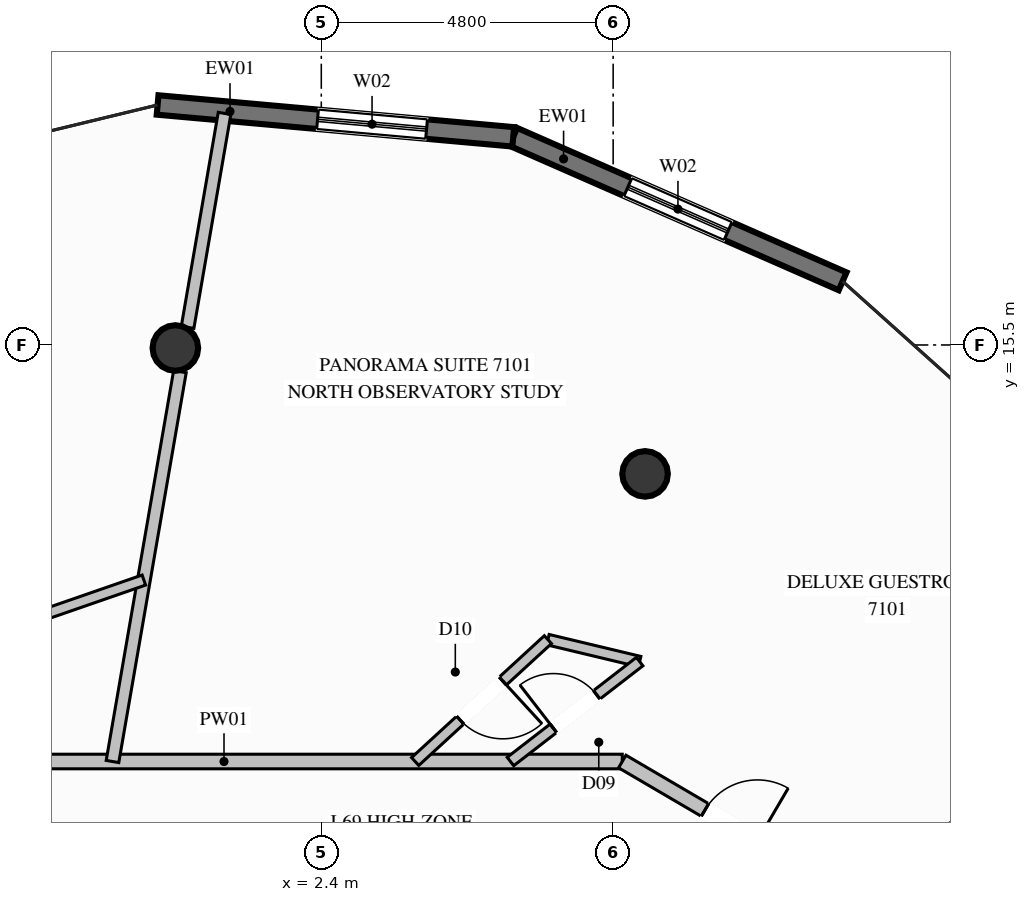
"""IFC4 building model, lengths in metres.
Left out: names, types, materials, properties, quantities, classifications, styles, units other than length and angle.
Written with IfcOpenShell. Run it as: python <this file> out.ifc"""

import sys

from ifc_helpers import new_model, si_unit, direction, frame, frame_2d, origin, origin_2d, place, context, subcontext, project, spatial, rectangle, circle, extrude, element, fill, save


model = new_model("IFC4")
c1 = context("Model", 3, precision=1e-05, world=origin(), true_north=direction((0.0, 1.0)))
c2 = subcontext(c1, "Body", "Model", "MODEL_VIEW")
j1 = project(units=[si_unit("LENGTHUNIT", "METRE"), si_unit("PLANEANGLEUNIT", "RADIAN")], contexts=[c1])
p1 = place(None, origin())
s1 = spatial("IfcSite", under=j1, at=p1, CompositionType="ELEMENT")
p2 = place(p1, origin())
s2 = spatial("IfcBuilding", under=s1, at=p2, CompositionType="ELEMENT")
p3 = place(p2, frame((0.0, 0.0, 266.8)))
s3 = spatial("IfcBuildingStorey", under=s2, at=p3, CompositionType="ELEMENT", Elevation=266.8)
for number, where, z_axis, x_axis in (
    (1, (7.725, 13.38, 0.0), (0.0, 0.0, 1.0), (1.0, 0.0, 0.0)),
    (2, (0.0, 15.45, 0.0), (0.0, 0.0, 1.0), (1.0, 0.0, 0.0)),
):
    element("IfcColumn", number, at=place(p3, frame(where, z_axis=z_axis, x_axis=x_axis)), inside=s3, PredefinedType="COLUMN", context=c2, shape_type="SweptSolid", body=[
        extrude(circle(Radius=0.375, at=origin_2d()), origin(), (0.0, 0.0, 1.0), 3.8),
    ])
p4 = place(p3, frame((5.557, 18.923, 0.0), z_axis=(0.0, 0.0, 1.0), x_axis=(0.915788475135, -0.401660887828, 0.0)))
e3 = element("IfcWall", 3, at=p4, inside=s3, PredefinedType="SOLIDWALL", context=c2, shape_type="SweptSolid", body=[
    extrude(rectangle(XDim=5.915, YDim=0.32, at=frame_2d((2.958, 0.0))), origin(), (0.0, 0.0, 1.0), 3.57),
])
p5 = place(p4, frame((2.058, 0.0, 0.35)))
e4 = element("IfcOpeningElement", 4, at=p5, cuts=e3, PredefinedType="OPENING", context=c2, shape_type="SweptSolid", body=[
    extrude(rectangle(XDim=1.8, YDim=2.6, at=frame_2d((0.9, 1.3))), frame((0.0, 0.17, 0.0), z_axis=(0.0, -1.0, 0.0), x_axis=(1.0, 0.0, 0.0)), (0.0, 0.0, 1.0), 0.34),
])
p6 = place(p3, frame((-0.292, 19.447, 0.0), z_axis=(0.0, 0.0, 1.0), x_axis=(0.996011950585, -0.08921992094, 0.0)))
e5 = element("IfcWall", 5, at=p6, inside=s3, PredefinedType="SOLIDWALL", context=c2, shape_type="SweptSolid", body=[
    extrude(rectangle(XDim=5.872, YDim=0.32, at=frame_2d((2.936, 0.0))), origin(), (0.0, 0.0, 1.0), 3.57),
])
p7 = place(p6, frame((2.641, 0.0, 0.35)))
e6 = element("IfcOpeningElement", 6, at=p7, cuts=e5, PredefinedType="OPENING", context=c2, shape_type="SweptSolid", body=[
    extrude(rectangle(XDim=1.8, YDim=2.6, at=frame_2d((0.9, 1.3))), frame((0.0, 0.17, 0.0), z_axis=(0.0, -1.0, 0.0), x_axis=(1.0, 0.0, 0.0)), (0.0, 0.0, 1.0), 0.34),
])
p8 = place(p3, frame((-5.75, 8.65, 0.0), z_axis=(0.0, 0.0, 1.0), x_axis=(1.0, 0.0, 0.0)))
e7 = element("IfcWall", 7, at=p8, inside=s3, PredefinedType="PARTITIONING", context=c2, shape_type="SweptSolid", body=[
    extrude(rectangle(XDim=13.1, YDim=0.24, at=frame_2d((6.55, 0.0))), origin(), (0.0, 0.0, 1.0), 3.57),
])
p9 = place(p3, frame((10.935, 6.55, 0.0), z_axis=(0.0, 0.0, 1.0), x_axis=(0.8804878863, 0.474068647011, 0.0)))
e8 = element("IfcWall", 8, at=p9, inside=s3, PredefinedType="PARTITIONING", context=c2, shape_type="SweptSolid", body=[
    extrude(rectangle(XDim=2.335, YDim=0.21, at=frame_2d((1.167, 0.0))), origin(), (0.0, 0.0, 1.0), 3.085),
])
p10 = place(p3, frame((6.127, 10.654, 0.0), z_axis=(0.0, 0.0, 1.0), x_axis=(0.972545612194, -0.23271233788, 0.0)))
e9 = element("IfcWall", 9, at=p10, inside=s3, PredefinedType="PLUMBINGWALL", context=c2, shape_type="SweptSolid", body=[
    extrude(rectangle(XDim=1.552, YDim=0.175, at=frame_2d((0.776, 0.0))), origin(), (0.0, 0.0, 1.0), 3.57),
])
p11 = place(p3, frame((6.127, 10.654, 0.0), z_axis=(0.0, 0.0, 1.0), x_axis=(-0.736616996747, -0.676310136035, 0.0)))
e10 = element("IfcWall", 10, at=p11, inside=s3, PredefinedType="PLUMBINGWALL", context=c2, shape_type="SweptSolid", body=[
    extrude(rectangle(XDim=2.963, YDim=0.175, at=frame_2d((1.482, 0.0))), origin(), (0.0, 0.0, 1.0), 3.57),
])
p12 = place(p11, frame((1.007, 0.0, 0.0)))
e11 = element("IfcOpeningElement", 11, at=p12, cuts=e10, PredefinedType="OPENING", context=c2, shape_type="SweptSolid", body=[
    extrude(rectangle(XDim=0.95, YDim=2.1, at=frame_2d((0.475, 1.05))), frame((0.0, 0.098, 0.0), z_axis=(0.0, -1.0, 0.0), x_axis=(1.0, 0.0, 0.0)), (0.0, 0.0, 1.0), 0.195),
])
p13 = place(p3, frame((5.511, 8.65, 0.0), z_axis=(0.0, 0.0, 1.0), x_axis=(0.791101070426, 0.611685455419, 0.0)))
e12 = element("IfcWall", 12, at=p13, inside=s3, PredefinedType="PLUMBINGWALL", context=c2, shape_type="SweptSolid", body=[
    extrude(rectangle(XDim=2.686, YDim=0.175, at=frame_2d((1.343, 0.0))), origin(), (0.0, 0.0, 1.0), 3.57),
])
p14 = place(p13, frame((0.893, 0.0, 0.0)))
e13 = element("IfcOpeningElement", 13, at=p14, cuts=e12, PredefinedType="OPENING", context=c2, shape_type="SweptSolid", body=[
    extrude(rectangle(XDim=0.9, YDim=2.1, at=frame_2d((0.45, 1.05))), frame((0.0, 0.098, 0.0), z_axis=(0.0, -1.0, 0.0), x_axis=(1.0, 0.0, 0.0)), (0.0, 0.0, 1.0), 0.195),
])
p15 = place(p3, frame((7.35, 8.65, 0.0), z_axis=(0.0, 0.0, 1.0), x_axis=(0.862873842462, -0.505419362505, 0.0)))
e14 = element("IfcWall", 14, at=p15, inside=s3, PredefinedType="PARTITIONING", context=c2, shape_type="SweptSolid", body=[
    extrude(rectangle(XDim=4.155, YDim=0.24, at=frame_2d((2.077, 0.0))), origin(), (0.0, 0.0, 1.0), 3.57),
])
p16 = place(p15, frame((1.577, 0.0, 0.0)))
e15 = element("IfcOpeningElement", 15, at=p16, cuts=e14, PredefinedType="OPENING", context=c2, shape_type="SweptSolid", body=[
    extrude(rectangle(XDim=1.0, YDim=2.2, at=frame_2d((0.5, 1.1))), frame((0.0, 0.13, 0.0), z_axis=(0.0, -1.0, 0.0), x_axis=(1.0, 0.0, 0.0)), (0.0, 0.0, 1.0), 0.26),
])
p17 = place(p3, frame((-1.034, 8.65, 0.0), z_axis=(0.0, 0.0, 1.0), x_axis=(0.170406932978, 0.985373775373, 0.0)))
e16 = element("IfcWall", 16, at=p17, inside=s3, PredefinedType="PARTITIONING", context=c2, shape_type="SweptSolid", body=[
    extrude(rectangle(XDim=6.507, YDim=0.21, at=frame_2d((3.254, 0.0))), origin(), (0.0, 0.0, 1.0), 3.57),
])
p18 = place(p3, frame((0.201, 15.79, 0.0), z_axis=(0.0, 0.0, 1.0), x_axis=(0.170339696933, 0.985385400566, 0.0)))
e17 = element("IfcWall", 17, at=p18, inside=s3, PredefinedType="PARTITIONING", context=c2, shape_type="SweptSolid", body=[
    extrude(rectangle(XDim=3.57, YDim=0.21, at=frame_2d((1.785, 0.0))), origin(), (0.0, 0.0, 1.0), 3.57),
])
p19 = place(p3, frame((-2.801, 10.843, 0.0), z_axis=(0.0, 0.0, 1.0), x_axis=(0.944888722347, 0.327391665106, 0.0)))
e18 = element("IfcWall", 18, at=p19, inside=s3, PredefinedType="PLUMBINGWALL", context=c2, shape_type="SweptSolid", body=[
    extrude(rectangle(XDim=2.416, YDim=0.175, at=frame_2d((1.208, 0.0))), origin(), (0.0, 0.0, 1.0), 3.57),
])
p20 = place(p5, origin())
e19 = element("IfcWindow", 19, at=p20, inside=s3, PartitioningType="SINGLE_PANEL", PredefinedType="WINDOW", context=c2, shape_type="SweptSolid", body=[
    extrude(rectangle(XDim=1.8, YDim=2.6, at=frame_2d((0.9, 1.3))), frame((0.0, 0.03, 0.0), z_axis=(0.0, -1.0, 0.0), x_axis=(1.0, 0.0, 0.0)), (0.0, 0.0, 1.0), 0.06),
])
fill(e4, e19)
p21 = place(p7, origin())
e20 = element("IfcWindow", 20, at=p21, inside=s3, PartitioningType="SINGLE_PANEL", PredefinedType="WINDOW", context=c2, shape_type="SweptSolid", body=[
    extrude(rectangle(XDim=1.8, YDim=2.6, at=frame_2d((0.9, 1.3))), frame((0.0, 0.03, 0.0), z_axis=(0.0, -1.0, 0.0), x_axis=(1.0, 0.0, 0.0)), (0.0, 0.0, 1.0), 0.06),
])
fill(e6, e20)
p22 = place(p14, origin())
e21 = element("IfcDoor", 21, at=p22, inside=s3, OperationType="SINGLE_SWING_LEFT", PredefinedType="DOOR", context=c2, shape_type="SweptSolid", body=[
    extrude(rectangle(XDim=0.9, YDim=2.1, at=frame_2d((0.45, 1.05))), frame((0.0, 0.025, 0.0), z_axis=(0.0, -1.0, 0.0), x_axis=(1.0, 0.0, 0.0)), (0.0, 0.0, 1.0), 0.05),
])
fill(e13, e21)
p23 = place(p16, origin())
e22 = element("IfcDoor", 22, at=p23, inside=s3, OperationType="SINGLE_SWING_RIGHT", PredefinedType="DOOR", context=c2, shape_type="SweptSolid", body=[
    extrude(rectangle(XDim=1.0, YDim=2.2, at=frame_2d((0.5, 1.1))), frame((0.0, 0.025, 0.0), z_axis=(0.0, -1.0, 0.0), x_axis=(1.0, 0.0, 0.0)), (0.0, 0.0, 1.0), 0.05),
])
fill(e15, e22)
p24 = place(p12, origin())
e23 = element("IfcDoor", 23, at=p24, inside=s3, OperationType="SINGLE_SWING_LEFT", PredefinedType="DOOR", context=c2, shape_type="SweptSolid", body=[
    extrude(rectangle(XDim=0.95, YDim=2.1, at=frame_2d((0.475, 1.05))), frame((0.0, 0.025, 0.0), z_axis=(0.0, -1.0, 0.0), x_axis=(1.0, 0.0, 0.0)), (0.0, 0.0, 1.0), 0.05),
])
fill(e11, e23)
save(model, sys.argv[1])
